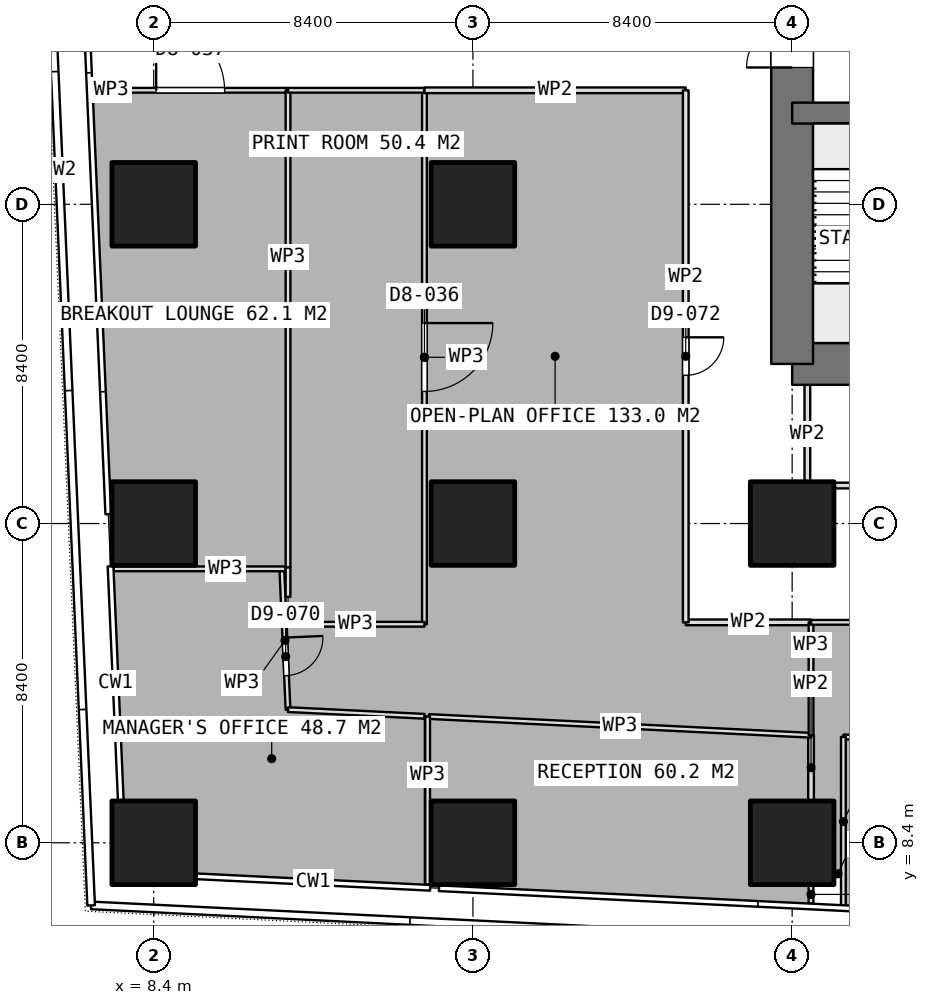
"""IFC4 building model, lengths in metres.
Left out: names, types, materials, properties, quantities, classifications, styles, units other than length and angle.
Written with IfcOpenShell. Run it as: python <this file> out.ifc"""

import sys

from ifc_helpers import new_model, si_unit, direction, frame, frame_2d, origin, origin_2d, place, context, subcontext, project, spatial, rectangle, extrude, element, fill, save


model = new_model("IFC4")
c1 = context("Model", 3, precision=1e-05, world=origin(), true_north=direction((0.0, 1.0)))
c2 = subcontext(c1, "Body", "Model", "MODEL_VIEW")
j1 = project(units=[si_unit("LENGTHUNIT", "METRE"), si_unit("PLANEANGLEUNIT", "RADIAN")], contexts=[c1])
p1 = place(None, origin())
s1 = spatial("IfcSite", under=j1, at=p1, CompositionType="ELEMENT")
p2 = place(p1, origin())
s2 = spatial("IfcBuilding", under=s1, at=p2, CompositionType="ELEMENT")
p3 = place(p2, frame((0.0, 0.0, 36.65)))
s3 = spatial("IfcBuildingStorey", under=s2, at=p3, CompositionType="ELEMENT", Elevation=36.65)
p4 = place(p3, frame((25.2, 21.0, 0.0), z_axis=(0.0, 0.0, 1.0), x_axis=(1.0, 0.0, 0.0)))
e1 = element("IfcWall", 1, at=p4, inside=s3, PredefinedType="SHEAR", context=c2, shape_type="SweptSolid", body=[
    extrude(rectangle(XDim=10.4, YDim=1.1, at=frame_2d((5.2, 0.0))), origin(), (0.0, 0.0, 1.0), 3.75),
])
p5 = place(p3, frame((25.2, 21.0, 0.0), z_axis=(0.0, 0.0, 1.0), x_axis=(0.0, 1.0, 0.0)))
e2 = element("IfcWall", 2, at=p5, inside=s3, PredefinedType="SHEAR", context=c2, shape_type="SweptSolid", body=[
    extrude(rectangle(XDim=25.2, YDim=1.1, at=frame_2d((12.6, 0.0))), origin(), (0.0, 0.0, 1.0), 3.75),
])
p6 = place(p5, frame((7.8, 0.0, 0.0)))
e3 = element("IfcOpeningElement", 3, at=p6, cuts=e2, PredefinedType="OPENING", context=c2, shape_type="SweptSolid", body=[
    extrude(rectangle(XDim=1.2, YDim=2.1, at=frame_2d((0.6, 1.05))), frame((0.0, 0.56, 0.0), z_axis=(0.0, -1.0, 0.0), x_axis=(1.0, 0.0, 0.0)), (0.0, 0.0, 1.0), 1.12),
])
p7 = place(p5, frame((14.25, 0.0, 0.0)))
e4 = element("IfcOpeningElement", 4, at=p7, cuts=e2, PredefinedType="OPENING", context=c2, shape_type="SweptSolid", body=[
    extrude(rectangle(XDim=0.9, YDim=2.1, at=frame_2d((0.45, 1.05))), frame((0.0, 0.56, 0.0), z_axis=(0.0, -1.0, 0.0), x_axis=(1.0, 0.0, 0.0)), (0.0, 0.0, 1.0), 1.12),
])
p8 = place(p5, frame((16.85, 0.0, 0.0)))
e5 = element("IfcOpeningElement", 5, at=p8, cuts=e2, PredefinedType="OPENING", context=c2, shape_type="SweptSolid", body=[
    extrude(rectangle(XDim=0.9, YDim=2.1, at=frame_2d((0.45, 1.05))), frame((0.0, 0.56, 0.0), z_axis=(0.0, -1.0, 0.0), x_axis=(1.0, 0.0, 0.0)), (0.0, 0.0, 1.0), 1.12),
])
p9 = place(p5, frame((19.075, 0.0, 0.0)))
e6 = element("IfcOpeningElement", 6, at=p9, cuts=e2, PredefinedType="OPENING", context=c2, shape_type="SweptSolid", body=[
    extrude(rectangle(XDim=1.2, YDim=2.1, at=frame_2d((0.6, 1.05))), frame((0.0, 0.56, 0.0), z_axis=(0.0, -1.0, 0.0), x_axis=(1.0, 0.0, 0.0)), (0.0, 0.0, 1.0), 1.12),
])
p10 = place(p3, frame((25.2, 27.6, 0.0), z_axis=(0.0, 0.0, 1.0), x_axis=(1.0, 0.0, 0.0)))
e7 = element("IfcWall", 7, at=p10, inside=s3, PredefinedType="SHEAR", context=c2, shape_type="SweptSolid", body=[
    extrude(rectangle(XDim=6.6, YDim=0.55, at=frame_2d((3.3, 0.0))), origin(), (0.0, 0.0, 1.0), 3.75),
])
p11 = place(p10, frame((4.925, 0.0, 0.0)))
e8 = element("IfcOpeningElement", 8, at=p11, cuts=e7, PredefinedType="OPENING", context=c2, shape_type="SweptSolid", body=[
    extrude(rectangle(XDim=1.2, YDim=2.1, at=frame_2d((0.6, 1.05))), frame((0.0, 0.285, 0.0), z_axis=(0.0, -1.0, 0.0), x_axis=(1.0, 0.0, 0.0)), (0.0, 0.0, 1.0), 0.57),
])
for number, where, z_axis, x_axis in (
    (9, (8.4, 8.4, 0.0), (0.0, 0.0, 1.0), (1.0, 0.0, 0.0)),
    (10, (8.4, 16.8, 0.0), (0.0, 0.0, 1.0), (1.0, 0.0, 0.0)),
    (11, (8.4, 25.2, 0.0), (0.0, 0.0, 1.0), (1.0, 0.0, 0.0)),
    (12, (16.8, 8.4, 0.0), (0.0, 0.0, 1.0), (1.0, 0.0, 0.0)),
    (13, (16.8, 16.8, 0.0), (0.0, 0.0, 1.0), (1.0, 0.0, 0.0)),
    (14, (16.8, 25.2, 0.0), (0.0, 0.0, 1.0), (1.0, 0.0, 0.0)),
    (15, (25.2, 8.4, 0.0), (0.0, 0.0, 1.0), (1.0, 0.0, 0.0)),
    (16, (25.2, 16.8, 0.0), (0.0, 0.0, 1.0), (1.0, 0.0, 0.0)),
):
    element("IfcColumn", number, at=place(p3, frame(where, z_axis=z_axis, x_axis=x_axis)), inside=s3, PredefinedType="COLUMN", context=c2, shape_type="SweptSolid", body=[
        extrude(rectangle(XDim=2.2, YDim=2.2, at=origin_2d()), origin(), (0.0, 0.0, 1.0), 3.75),
    ])
p12 = place(p3, frame((25.525, 17.8, 0.0), z_axis=(0.0, 0.0, 1.0), x_axis=(1.0, 0.0, 0.0)))
e17 = element("IfcWall", 17, at=p12, inside=s3, PredefinedType="PARTITIONING", context=c2, shape_type="SweptSolid", body=[
    extrude(rectangle(XDim=9.75, YDim=0.15, at=frame_2d((4.875, 0.0))), origin(), (0.0, 0.0, 1.0), 3.5),
])
p13 = place(p12, frame((4.375, 0.0, 0.0)))
e18 = element("IfcOpeningElement", 18, at=p13, cuts=e17, PredefinedType="OPENING", context=c2, shape_type="SweptSolid", body=[
    extrude(rectangle(XDim=1.0, YDim=2.1, at=frame_2d((0.5, 1.05))), frame((0.0, 0.085, 0.0), z_axis=(0.0, -1.0, 0.0), x_axis=(1.0, 0.0, 0.0)), (0.0, 0.0, 1.0), 0.17),
])
p14 = place(p3, frame((25.6, 17.875, 0.0), z_axis=(0.0, 0.0, 1.0), x_axis=(0.0, 1.0, 0.0)))
e19 = element("IfcWall", 19, at=p14, inside=s3, PredefinedType="PARTITIONING", context=c2, shape_type="SweptSolid", body=[
    extrude(rectangle(XDim=2.575, YDim=0.15, at=frame_2d((1.288, 0.0))), origin(), (0.0, 0.0, 1.0), 3.5),
])
p15 = place(p3, frame((26.548, 11.187, 0.0), z_axis=(0.0, 0.0, 1.0), x_axis=(0.998797680893, -0.049022368804, 0.0)))
e20 = element("IfcWall", 20, at=p15, inside=s3, PredefinedType="PARTITIONING", context=c2, shape_type="SweptSolid", body=[
    extrude(rectangle(XDim=8.302, YDim=0.125, at=frame_2d((4.151, 0.0))), origin(), (0.0, 0.0, 1.0), 3.5),
])
p16 = place(p15, frame((3.291, 0.0, 0.0)))
e21 = element("IfcOpeningElement", 21, at=p16, cuts=e20, PredefinedType="OPENING", context=c2, shape_type="SweptSolid", body=[
    extrude(rectangle(XDim=1.0, YDim=2.1, at=frame_2d((0.5, 1.05))), frame((0.0, 0.073, 0.0), z_axis=(0.0, -1.0, 0.0), x_axis=(1.0, 0.0, 0.0)), (0.0, 0.0, 1.0), 0.145),
])
p17 = place(p3, frame((26.548, 6.732, 0.0), z_axis=(0.0, 0.0, 1.0), x_axis=(0.0, 1.0, 0.0)))
e22 = element("IfcWall", 22, at=p17, inside=s3, PredefinedType="PARTITIONING", context=c2, shape_type="SweptSolid", body=[
    extrude(rectangle(XDim=4.455, YDim=0.125, at=frame_2d((2.228, 0.0))), origin(), (0.0, 0.0, 1.0), 3.5),
])
p18 = place(p3, frame((15.643, 11.722, 0.0), z_axis=(0.0, 0.0, 1.0), x_axis=(0.998800316201, -0.048968646667, 0.0)))
e23 = element("IfcWall", 23, at=p18, inside=s3, PredefinedType="PARTITIONING", context=c2, shape_type="SweptSolid", body=[
    extrude(rectangle(XDim=10.066, YDim=0.125, at=frame_2d((5.033, 0.0))), origin(), (0.0, 0.0, 1.0), 3.5),
])
p19 = place(p3, frame((25.697, 11.229, 0.0), z_axis=(0.0, 0.0, 1.0), x_axis=(0.0, 1.0, 0.0)))
e24 = element("IfcWall", 24, at=p19, inside=s3, PredefinedType="PARTITIONING", context=c2, shape_type="SweptSolid", body=[
    extrude(rectangle(XDim=2.971, YDim=0.125, at=frame_2d((1.485, 0.0))), origin(), (0.0, 0.0, 1.0), 3.5),
])
p20 = place(p3, frame((25.697, 14.2, 0.0), z_axis=(0.0, 0.0, 1.0), x_axis=(1.0, 0.0, 0.0)))
e25 = element("IfcWall", 25, at=p20, inside=s3, PredefinedType="PARTITIONING", context=c2, shape_type="SweptSolid", body=[
    extrude(rectangle(XDim=5.303, YDim=0.125, at=frame_2d((2.651, 0.0))), origin(), (0.0, 0.0, 1.0), 3.5),
])
p21 = place(p20, frame((1.752, 0.0, 0.0)))
e26 = element("IfcOpeningElement", 26, at=p21, cuts=e25, PredefinedType="OPENING", context=c2, shape_type="SweptSolid", body=[
    extrude(rectangle(XDim=1.8, YDim=2.1, at=frame_2d((0.9, 1.05))), frame((0.0, 0.073, 0.0), z_axis=(0.0, -1.0, 0.0), x_axis=(1.0, 0.0, 0.0)), (0.0, 0.0, 1.0), 0.145),
])
p22 = place(p3, frame((26.485, 7.584, 0.0), z_axis=(0.0, 0.0, 1.0), x_axis=(-1.0, 0.0, 0.0)))
e27 = element("IfcWall", 27, at=p22, inside=s3, PredefinedType="PARTITIONING", context=c2, shape_type="SweptSolid", body=[
    extrude(rectangle(XDim=0.165, YDim=0.125, at=frame_2d((0.083, 0.0))), origin(), (0.0, 0.0, 1.0), 3.5),
])
p23 = place(p3, frame((25.696, 7.28, 0.0), z_axis=(0.0, 0.0, 1.0), x_axis=(0.0, -1.0, 0.0)))
e28 = element("IfcWall", 28, at=p23, inside=s3, PredefinedType="PARTITIONING", context=c2, shape_type="SweptSolid", body=[
    extrude(rectangle(XDim=0.477, YDim=0.125, at=frame_2d((0.239, 0.0))), origin(), (0.0, 0.0, 1.0), 3.5),
])
p24 = place(p3, frame((15.608, 7.299, 0.0), z_axis=(0.0, 0.0, 1.0), x_axis=(0.0, 1.0, 0.0)))
e29 = element("IfcWall", 29, at=p24, inside=s3, PredefinedType="PARTITIONING", context=c2, shape_type="SweptSolid", body=[
    extrude(rectangle(XDim=4.423, YDim=0.125, at=frame_2d((2.211, 0.0))), origin(), (0.0, 0.0, 1.0), 3.5),
])
p25 = place(p3, frame((6.767, 28.2, 0.0), z_axis=(0.0, 0.0, 1.0), x_axis=(1.0, 0.0, 0.0)))
e30 = element("IfcWall", 30, at=p25, inside=s3, PredefinedType="PARTITIONING", context=c2, shape_type="SweptSolid", body=[
    extrude(rectangle(XDim=5.167, YDim=0.125, at=frame_2d((2.583, 0.0))), origin(), (0.0, 0.0, 1.0), 3.5),
])
p26 = place(p25, frame((1.698, 0.0, 0.0)))
e31 = element("IfcOpeningElement", 31, at=p26, cuts=e30, PredefinedType="OPENING", context=c2, shape_type="SweptSolid", body=[
    extrude(rectangle(XDim=1.8, YDim=2.1, at=frame_2d((0.9, 1.05))), frame((0.0, 0.073, 0.0), z_axis=(0.0, -1.0, 0.0), x_axis=(1.0, 0.0, 0.0)), (0.0, 0.0, 1.0), 0.145),
])
p27 = place(p3, frame((11.934, 28.2, 0.0), z_axis=(0.0, 0.0, 1.0), x_axis=(0.0, -1.0, 0.0)))
e32 = element("IfcWall", 32, at=p27, inside=s3, PredefinedType="PARTITIONING", context=c2, shape_type="SweptSolid", body=[
    extrude(rectangle(XDim=12.557, YDim=0.125, at=frame_2d((6.278, 0.0))), origin(), (0.0, 0.0, 1.0), 3.5),
])
p28 = place(p3, frame((11.871, 15.608, 0.0), z_axis=(0.0, 0.0, 1.0), x_axis=(-1.0, 0.0, 0.0)))
e33 = element("IfcWall", 33, at=p28, inside=s3, PredefinedType="PARTITIONING", context=c2, shape_type="SweptSolid", body=[
    extrude(rectangle(XDim=4.524, YDim=0.125, at=frame_2d((2.262, 0.0))), origin(), (0.0, 0.0, 1.0), 3.5),
])
p29 = place(p3, frame((11.774, 15.546, 0.0), z_axis=(0.0, 0.0, 1.0), x_axis=(0.043934208205, -0.999034426509, 0.0)))
e34 = element("IfcWall", 34, at=p29, inside=s3, PredefinedType="PARTITIONING", context=c2, shape_type="SweptSolid", body=[
    extrude(rectangle(XDim=3.645, YDim=0.125, at=frame_2d((1.823, 0.0))), origin(), (0.0, 0.0, 1.0), 3.5),
])
p30 = place(p29, frame((1.749, 0.0, 0.0)))
e35 = element("IfcOpeningElement", 35, at=p30, cuts=e34, PredefinedType="OPENING", context=c2, shape_type="SweptSolid", body=[
    extrude(rectangle(XDim=1.0, YDim=2.1, at=frame_2d((0.5, 1.05))), frame((0.0, 0.073, 0.0), z_axis=(0.0, -1.0, 0.0), x_axis=(1.0, 0.0, 0.0)), (0.0, 0.0, 1.0), 0.145),
])
p31 = place(p3, frame((11.934, 11.904, 0.0), z_axis=(0.0, 0.0, 1.0), x_axis=(0.998799983391, -0.048975434441, 0.0)))
e36 = element("IfcWall", 36, at=p31, inside=s3, PredefinedType="PARTITIONING", context=c2, shape_type="SweptSolid", body=[
    extrude(rectangle(XDim=3.594, YDim=0.125, at=frame_2d((1.797, 0.0))), origin(), (0.0, 0.0, 1.0), 3.5),
])
p32 = place(p3, frame((15.524, 28.2, 0.0), z_axis=(0.0, 0.0, 1.0), x_axis=(0.0, -1.0, 0.0)))
e37 = element("IfcWall", 37, at=p32, inside=s3, PredefinedType="PARTITIONING", context=c2, shape_type="SweptSolid", body=[
    extrude(rectangle(XDim=14.05, YDim=0.125, at=frame_2d((7.025, 0.0))), origin(), (0.0, 0.0, 1.0), 3.5),
])
p33 = place(p32, frame((6.125, 0.0, 0.0)))
e38 = element("IfcOpeningElement", 38, at=p33, cuts=e37, PredefinedType="OPENING", context=c2, shape_type="SweptSolid", body=[
    extrude(rectangle(XDim=1.8, YDim=2.1, at=frame_2d((0.9, 1.05))), frame((0.0, 0.073, 0.0), z_axis=(0.0, -1.0, 0.0), x_axis=(1.0, 0.0, 0.0)), (0.0, 0.0, 1.0), 0.145),
])
p34 = place(p3, frame((15.524, 14.15, 0.0), z_axis=(0.0, 0.0, 1.0), x_axis=(-1.0, 0.0, 0.0)))
e39 = element("IfcWall", 39, at=p34, inside=s3, PredefinedType="PARTITIONING", context=c2, shape_type="SweptSolid", body=[
    extrude(rectangle(XDim=3.626, YDim=0.125, at=frame_2d((1.813, 0.0))), origin(), (0.0, 0.0, 1.0), 3.5),
])
p35 = place(p3, frame((11.934, 14.871, 0.0), z_axis=(0.0, 0.0, 1.0), x_axis=(0.0, 1.0, 0.0)))
e40 = element("IfcWall", 40, at=p35, inside=s3, PredefinedType="PARTITIONING", context=c2, shape_type="SweptSolid", body=[
    extrude(rectangle(XDim=0.772, YDim=0.125, at=frame_2d((0.386, 0.0))), origin(), (0.0, 0.0, 1.0), 3.5),
])
p36 = place(p3, frame((11.934, 28.2, 0.0), z_axis=(0.0, 0.0, 1.0), x_axis=(1.0, 0.0, 0.0)))
e41 = element("IfcWall", 41, at=p36, inside=s3, PredefinedType="PARTITIONING", context=c2, shape_type="SweptSolid", body=[
    extrude(rectangle(XDim=3.59, YDim=0.125, at=frame_2d((1.795, 0.0))), origin(), (0.0, 0.0, 1.0), 3.5),
])
p37 = place(p3, frame((15.524, 28.2, 0.0), z_axis=(0.0, 0.0, 1.0), x_axis=(1.0, 0.0, 0.0)))
e42 = element("IfcWall", 42, at=p37, inside=s3, PredefinedType="PARTITIONING", context=c2, shape_type="SweptSolid", body=[
    extrude(rectangle(XDim=6.876, YDim=0.15, at=frame_2d((3.438, 0.0))), origin(), (0.0, 0.0, 1.0), 3.5),
])
p38 = place(p3, frame((22.4, 28.2, 0.0), z_axis=(0.0, 0.0, 1.0), x_axis=(0.0, -1.0, 0.0)))
e43 = element("IfcWall", 43, at=p38, inside=s3, PredefinedType="PARTITIONING", context=c2, shape_type="SweptSolid", body=[
    extrude(rectangle(XDim=14.0, YDim=0.15, at=frame_2d((7.0, 0.0))), origin(), (0.0, 0.0, 1.0), 3.5),
])
p39 = place(p38, frame((6.5, 0.0, 0.0)))
e44 = element("IfcOpeningElement", 44, at=p39, cuts=e43, PredefinedType="OPENING", context=c2, shape_type="SweptSolid", body=[
    extrude(rectangle(XDim=1.0, YDim=2.1, at=frame_2d((0.5, 1.05))), frame((0.0, 0.085, 0.0), z_axis=(0.0, -1.0, 0.0), x_axis=(1.0, 0.0, 0.0)), (0.0, 0.0, 1.0), 0.17),
])
p40 = place(p3, frame((22.4, 14.2, 0.0), z_axis=(0.0, 0.0, 1.0), x_axis=(1.0, 0.0, 0.0)))
e45 = element("IfcWall", 45, at=p40, inside=s3, PredefinedType="PARTITIONING", context=c2, shape_type="SweptSolid", body=[
    extrude(rectangle(XDim=3.297, YDim=0.15, at=frame_2d((1.648, 0.0))), origin(), (0.0, 0.0, 1.0), 3.5),
])
p41 = place(p3, frame((25.697, 11.229, 0.0), z_axis=(0.0, 0.0, 1.0), x_axis=(0.0, -1.0, 0.0)))
e46 = element("IfcWall", 46, at=p41, inside=s3, PredefinedType="PARTITIONING", context=c2, shape_type="SweptSolid", body=[
    extrude(rectangle(XDim=1.709, YDim=0.15, at=frame_2d((0.854, 0.0))), origin(), (0.0, 0.0, 1.0), 3.5),
])
p42 = place(p6, origin())
e47 = element("IfcDoor", 47, at=p42, inside=s3, OperationType="SINGLE_SWING_LEFT", PredefinedType="DOOR", context=c2, shape_type="SweptSolid", body=[
    extrude(rectangle(XDim=1.2, YDim=2.1, at=frame_2d((0.6, 1.05))), frame((0.0, 0.025, 0.0), z_axis=(0.0, -1.0, 0.0), x_axis=(1.0, 0.0, 0.0)), (0.0, 0.0, 1.0), 0.05),
])
fill(e3, e47)
p43 = place(p26, origin())
e48 = element("IfcDoor", 48, at=p43, inside=s3, OperationType="DOUBLE_DOOR_SINGLE_SWING", PredefinedType="DOOR", context=c2, shape_type="SweptSolid", body=[
    extrude(rectangle(XDim=1.8, YDim=2.1, at=frame_2d((0.9, 1.05))), frame((0.0, 0.025, 0.0), z_axis=(0.0, -1.0, 0.0), x_axis=(1.0, 0.0, 0.0)), (0.0, 0.0, 1.0), 0.05),
])
fill(e31, e48)
p44 = place(p30, origin())
e49 = element("IfcDoor", 49, at=p44, inside=s3, OperationType="SINGLE_SWING_LEFT", PredefinedType="DOOR", context=c2, shape_type="SweptSolid", body=[
    extrude(rectangle(XDim=1.0, YDim=2.1, at=frame_2d((0.5, 1.05))), frame((0.0, 0.025, 0.0), z_axis=(0.0, -1.0, 0.0), x_axis=(1.0, 0.0, 0.0)), (0.0, 0.0, 1.0), 0.05),
])
fill(e35, e49)
p45 = place(p33, origin())
e50 = element("IfcDoor", 50, at=p45, inside=s3, OperationType="DOUBLE_DOOR_SINGLE_SWING", PredefinedType="DOOR", context=c2, shape_type="SweptSolid", body=[
    extrude(rectangle(XDim=1.8, YDim=2.1, at=frame_2d((0.9, 1.05))), frame((0.0, 0.025, 0.0), z_axis=(0.0, -1.0, 0.0), x_axis=(1.0, 0.0, 0.0)), (0.0, 0.0, 1.0), 0.05),
])
fill(e38, e50)
p46 = place(p39, origin())
e51 = element("IfcDoor", 51, at=p46, inside=s3, OperationType="SINGLE_SWING_LEFT", PredefinedType="DOOR", context=c2, shape_type="SweptSolid", body=[
    extrude(rectangle(XDim=1.0, YDim=2.1, at=frame_2d((0.5, 1.05))), frame((0.0, 0.025, 0.0), z_axis=(0.0, -1.0, 0.0), x_axis=(1.0, 0.0, 0.0)), (0.0, 0.0, 1.0), 0.05),
])
fill(e44, e51)
save(model, sys.argv[1])
